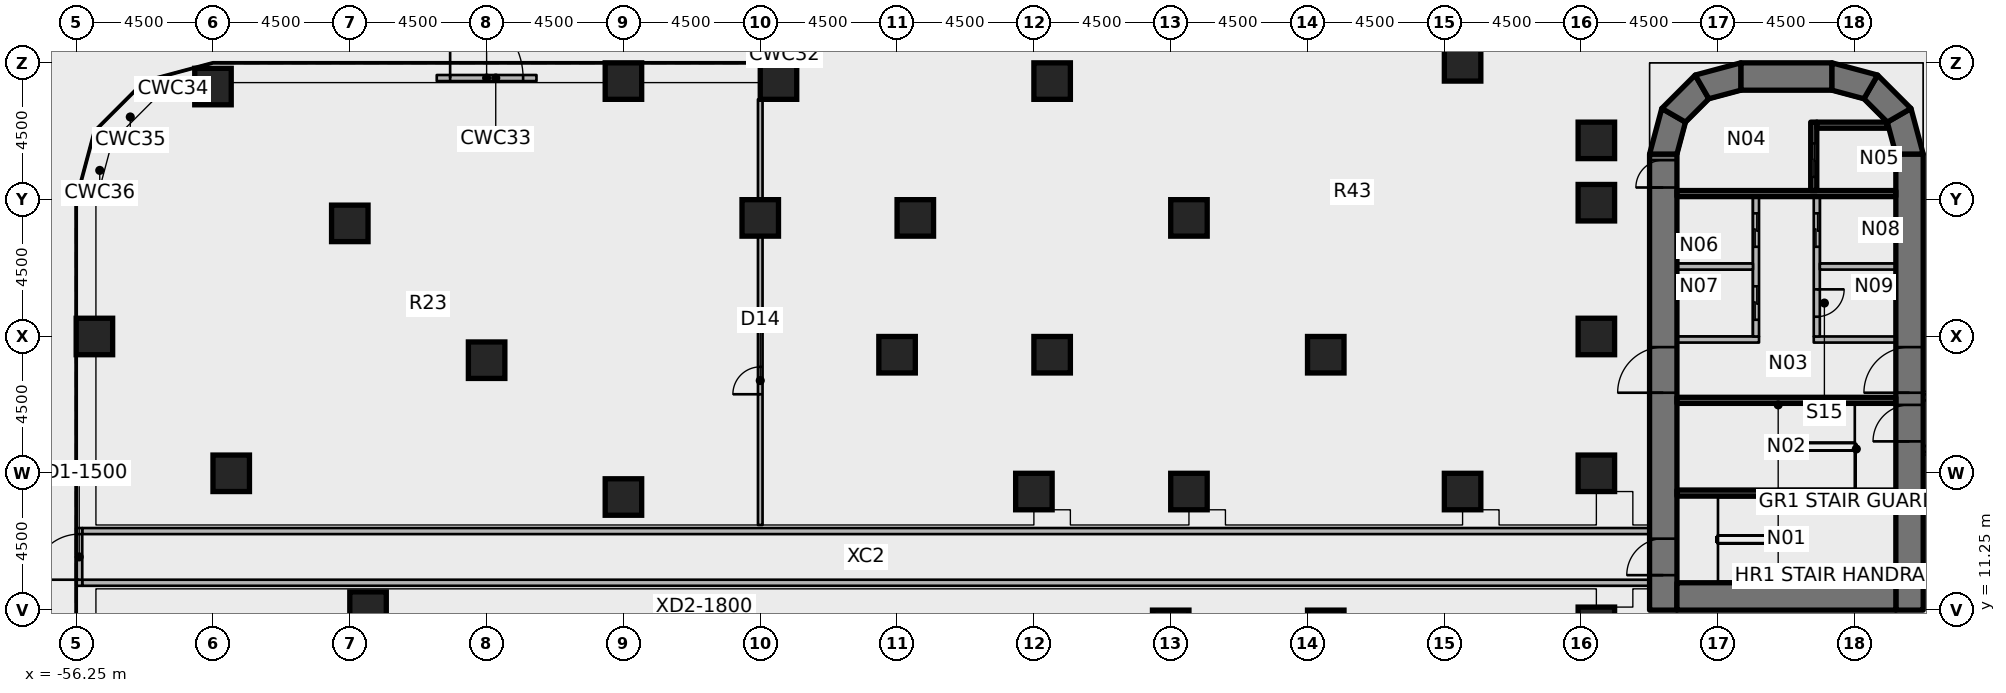
"""IFC4 building model, lengths in metres.
Left out: names, types, materials, properties, quantities, classifications, styles, units other than length and angle.
Written with IfcOpenShell. Run it as: python <this file> out.ifc"""

import sys

from ifc_helpers import new_model, si_unit, direction, frame, frame_2d, origin, origin_2d, place, context, subcontext, project, spatial, polyline, rectangle, outline, extrude, element, fill, save


model = new_model("IFC4")
c1 = context("Model", 3, precision=1e-05, world=origin(), true_north=direction((0.0, 1.0)))
c2 = subcontext(c1, "Body", "Model", "MODEL_VIEW")
j1 = project(units=[si_unit("LENGTHUNIT", "METRE"), si_unit("PLANEANGLEUNIT", "RADIAN")], contexts=[c1])
p1 = place(None, origin())
s1 = spatial("IfcSite", under=j1, at=p1, CompositionType="ELEMENT")
p2 = place(p1, origin())
s2 = spatial("IfcBuilding", under=s1, at=p2, CompositionType="ELEMENT")
p3 = place(p2, origin())
s3 = spatial("IfcBuildingStorey", under=s2, at=p3, CompositionType="ELEMENT", Elevation=0.0)
for number, where, z_axis, x_axis in (
    (1, (-55.65, 20.25, 0.0), (0.0, 0.0, 1.0), (1.0, 0.0, 0.0)),
    (2, (-51.15, 15.75, 0.0), (0.0, 0.0, 1.0), (1.0, 0.0, 0.0)),
    (3, (-51.75, 28.47, 0.0), (0.0, 0.0, 1.0), (1.0, 0.0, 0.0)),
    (4, (-46.65, 11.25, 0.0), (0.0, 0.0, 1.0), (1.0, 0.0, 0.0)),
    (5, (-47.25, 23.97, 0.0), (0.0, 0.0, 1.0), (1.0, 0.0, 0.0)),
    (6, (-42.75, 19.47, 0.0), (0.0, 0.0, 1.0), (1.0, 0.0, 0.0)),
    (7, (-38.25, 14.97, 0.0), (0.0, 0.0, 1.0), (1.0, 0.0, 0.0)),
    (8, (-38.25, 28.65, 0.0), (0.0, 0.0, 1.0), (1.0, 0.0, 0.0)),
    (9, (-33.75, 24.15, 0.0), (0.0, 0.0, 1.0), (1.0, 0.0, 0.0)),
    (10, (-33.15, 28.65, 0.0), (0.0, 0.0, 1.0), (1.0, 0.0, 0.0)),
    (11, (-29.25, 19.65, 0.0), (0.0, 0.0, 1.0), (1.0, 0.0, 0.0)),
    (12, (-28.65, 24.15, 0.0), (0.0, 0.0, 1.0), (1.0, 0.0, 0.0)),
    (13, (-24.75, 15.15, 0.0), (0.0, 0.0, 1.0), (1.0, 0.0, 0.0)),
    (14, (-24.15, 19.65, 0.0), (0.0, 0.0, 1.0), (1.0, 0.0, 0.0)),
    (15, (-24.15, 28.65, 0.0), (0.0, 0.0, 1.0), (1.0, 0.0, 0.0)),
    (16, (-20.25, 10.65, 0.0), (0.0, 0.0, 1.0), (1.0, 0.0, 0.0)),
    (17, (-19.65, 15.15, 0.0), (0.0, 0.0, 1.0), (1.0, 0.0, 0.0)),
    (18, (-19.65, 24.15, 0.0), (0.0, 0.0, 1.0), (1.0, 0.0, 0.0)),
    (19, (-15.15, 10.65, 0.0), (0.0, 0.0, 1.0), (1.0, 0.0, 0.0)),
    (20, (-15.15, 19.65, 0.0), (0.0, 0.0, 1.0), (1.0, 0.0, 0.0)),
    (21, (-10.65, 15.15, 0.0), (0.0, 0.0, 1.0), (1.0, 0.0, 0.0)),
    (22, (-10.65, 29.25, 0.0), (0.0, 0.0, 1.0), (1.0, 0.0, 0.0)),
    (23, (-6.25, 10.75, 0.0), (0.0, 0.0, 1.0), (1.0, 0.0, 0.0)),
    (24, (-6.25, 15.75, 0.0), (0.0, 0.0, 1.0), (1.0, 0.0, 0.0)),
    (25, (-6.25, 20.25, 0.0), (0.0, 0.0, 1.0), (1.0, 0.0, 0.0)),
    (26, (-6.25, 24.65, 0.0), (0.0, 0.0, 1.0), (1.0, 0.0, 0.0)),
    (27, (-6.25, 26.7, 0.0), (0.0, 0.0, 1.0), (1.0, 0.0, 0.0)),
):
    element("IfcColumn", number, at=place(p3, frame(where, z_axis=z_axis, x_axis=x_axis)), inside=s3, PredefinedType="COLUMN", context=c2, shape_type="SweptSolid", body=[
        extrude(rectangle(XDim=1.2, YDim=1.2, at=origin_2d()), origin(), (0.0, 0.0, 1.0), 6.55),
    ])
p4 = place(p3, frame((-4.05, 11.25, 0.0), z_axis=(0.0, 0.0, 1.0), x_axis=(0.0, 1.0, 0.0)))
e28 = element("IfcWall", 28, at=p4, inside=s3, PredefinedType="SHEAR", context=c2, shape_type="SweptSolid", body=[
    extrude(rectangle(XDim=15.0, YDim=0.9, at=frame_2d((7.5, 0.0))), origin(), (0.0, 0.0, 1.0), 7.0),
])
p5 = place(p4, frame((7.15, 0.0, 0.0)))
e29 = element("IfcOpeningElement", 29, at=p5, cuts=e28, PredefinedType="OPENING", context=c2, shape_type="SweptSolid", body=[
    extrude(rectangle(XDim=1.5, YDim=2.3, at=frame_2d((0.75, 1.15))), frame((0.0, 0.46, 0.0), z_axis=(0.0, -1.0, 0.0), x_axis=(1.0, 0.0, 0.0)), (0.0, 0.0, 1.0), 0.92),
])
p6 = place(p4, frame((13.9, 0.0, 0.0)))
e30 = element("IfcOpeningElement", 30, at=p6, cuts=e28, PredefinedType="OPENING", context=c2, shape_type="SweptSolid", body=[
    extrude(rectangle(XDim=0.9, YDim=2.1, at=frame_2d((0.45, 1.05))), frame((0.0, 0.46, 0.0), z_axis=(0.0, -1.0, 0.0), x_axis=(1.0, 0.0, 0.0)), (0.0, 0.0, 1.0), 0.92),
])
p7 = place(p4, frame((1.15, 0.0, 0.0)))
e31 = element("IfcOpeningElement", 31, at=p7, cuts=e28, PredefinedType="OPENING", context=c2, shape_type="SweptSolid", body=[
    extrude(rectangle(XDim=1.2, YDim=2.1, at=frame_2d((0.6, 1.05))), frame((0.0, 0.46, 0.0), z_axis=(0.0, -1.0, 0.0), x_axis=(1.0, 0.0, 0.0)), (0.0, 0.0, 1.0), 0.92),
])
p8 = place(p3, frame((4.05, 11.25, 0.0), z_axis=(0.0, 0.0, 1.0), x_axis=(0.0, 1.0, 0.0)))
e32 = element("IfcWall", 32, at=p8, inside=s3, PredefinedType="SHEAR", context=c2, shape_type="SweptSolid", body=[
    extrude(rectangle(XDim=15.0, YDim=0.9, at=frame_2d((7.5, 0.0))), origin(), (0.0, 0.0, 1.0), 7.0),
])
p9 = place(p8, frame((7.15, 0.0, 0.0)))
e33 = element("IfcOpeningElement", 33, at=p9, cuts=e32, PredefinedType="OPENING", context=c2, shape_type="SweptSolid", body=[
    extrude(rectangle(XDim=1.5, YDim=2.3, at=frame_2d((0.75, 1.15))), frame((0.0, 0.46, 0.0), z_axis=(0.0, -1.0, 0.0), x_axis=(1.0, 0.0, 0.0)), (0.0, 0.0, 1.0), 0.92),
])
p10 = place(p8, frame((5.55, 0.0, 0.0)))
e34 = element("IfcOpeningElement", 34, at=p10, cuts=e32, PredefinedType="OPENING", context=c2, shape_type="SweptSolid", body=[
    extrude(rectangle(XDim=1.2, YDim=2.1, at=frame_2d((0.6, 1.05))), frame((0.0, 0.46, 0.0), z_axis=(0.0, -1.0, 0.0), x_axis=(1.0, 0.0, 0.0)), (0.0, 0.0, 1.0), 0.92),
])
p11 = place(p3, frame((-3.6, 11.7, 0.0), z_axis=(0.0, 0.0, 1.0), x_axis=(1.0, 0.0, 0.0)))
e35 = element("IfcWall", 35, at=p11, inside=s3, PredefinedType="SHEAR", context=c2, shape_type="SweptSolid", body=[
    extrude(rectangle(XDim=7.2, YDim=0.9, at=frame_2d((3.6, 0.0))), origin(), (0.0, 0.0, 1.0), 7.0),
])
p12 = place(p3, frame((-1.5, 28.8, 0.0), z_axis=(0.0, 0.0, 1.0), x_axis=(1.0, 0.0, 0.0)))
e36 = element("IfcWall", 36, at=p12, inside=s3, PredefinedType="SHEAR", context=c2, shape_type="SweptSolid", body=[
    extrude(rectangle(XDim=3.0, YDim=0.9, at=frame_2d((1.5, 0.0))), origin(), (0.0, 0.0, 1.0), 7.0),
])
p13 = place(p3, origin())
e37 = element("IfcWall", 37, at=p13, inside=s3, PredefinedType="SHEAR", context=c2, shape_type="SweptSolid", body=[
    extrude(outline(polyline([(-4.5, 26.25), (-4.098, 27.75), (-3.319, 27.3), (-3.6, 26.25), (-4.5, 26.25)])), origin(), (0.0, 0.0, 1.0), 7.0),
])
p14 = place(p3, origin())
e38 = element("IfcWall", 38, at=p14, inside=s3, PredefinedType="SHEAR", context=c2, shape_type="SweptSolid", body=[
    extrude(outline(polyline([(-4.098, 27.75), (-3.0, 28.848), (-2.55, 28.069), (-3.319, 27.3), (-4.098, 27.75)])), origin(), (0.0, 0.0, 1.0), 7.0),
])
p15 = place(p3, origin())
e39 = element("IfcWall", 39, at=p15, inside=s3, PredefinedType="SHEAR", context=c2, shape_type="SweptSolid", body=[
    extrude(outline(polyline([(-3.0, 28.848), (-1.5, 29.25), (-1.5, 28.35), (-2.55, 28.069), (-3.0, 28.848)])), origin(), (0.0, 0.0, 1.0), 7.0),
])
p16 = place(p3, origin())
e40 = element("IfcWall", 40, at=p16, inside=s3, PredefinedType="SHEAR", context=c2, shape_type="SweptSolid", body=[
    extrude(outline(polyline([(4.5, 26.25), (4.098, 27.75), (3.319, 27.3), (3.6, 26.25), (4.5, 26.25)])), origin(), (0.0, 0.0, 1.0), 7.0),
])
p17 = place(p3, origin())
e41 = element("IfcWall", 41, at=p17, inside=s3, PredefinedType="SHEAR", context=c2, shape_type="SweptSolid", body=[
    extrude(outline(polyline([(4.098, 27.75), (3.0, 28.848), (2.55, 28.069), (3.319, 27.3), (4.098, 27.75)])), origin(), (0.0, 0.0, 1.0), 7.0),
])
p18 = place(p3, origin())
e42 = element("IfcWall", 42, at=p18, inside=s3, PredefinedType="SHEAR", context=c2, shape_type="SweptSolid", body=[
    extrude(outline(polyline([(3.0, 28.848), (1.5, 29.25), (1.5, 28.35), (2.55, 28.069), (3.0, 28.848)])), origin(), (0.0, 0.0, 1.0), 7.0),
])
p19 = place(p3, frame((-44.39, 28.75, 0.0), z_axis=(0.0, 0.0, 1.0), x_axis=(1.0, 0.0, 0.0)))
e43 = element("IfcWall", 43, at=p19, inside=s3, PredefinedType="SOLIDWALL", context=c2, shape_type="SweptSolid", body=[
    extrude(rectangle(XDim=3.28, YDim=0.2, at=frame_2d((1.64, 0.0))), origin(), (0.0, 0.0, 1.0), 5.6),
])
p20 = place(p19, frame((0.44, 0.0, 0.0)))
e44 = element("IfcOpeningElement", 44, at=p20, cuts=e43, PredefinedType="OPENING", context=c2, shape_type="SweptSolid", body=[
    extrude(rectangle(XDim=2.4, YDim=2.7, at=frame_2d((1.2, 1.35))), frame((0.0, 0.11, 0.0), z_axis=(0.0, -1.0, 0.0), x_axis=(1.0, 0.0, 0.0)), (0.0, 0.0, 1.0), 0.22),
])
p21 = place(p3, frame((-3.6, 24.95, 0.0), z_axis=(0.0, 0.0, 1.0), x_axis=(1.0, 0.0, 0.0)))
e45 = element("IfcWall", 45, at=p21, inside=s3, PredefinedType="SHEAR", context=c2, shape_type="SweptSolid", body=[
    extrude(rectangle(XDim=7.2, YDim=0.2, at=frame_2d((3.6, 0.0))), origin(), (0.0, 0.0, 1.0), 6.55),
])
p22 = place(p3, frame((0.9, 27.3, 0.0), z_axis=(0.0, 0.0, 1.0), x_axis=(0.0, -1.0, 0.0)))
e46 = element("IfcWall", 46, at=p22, inside=s3, PredefinedType="SHEAR", context=c2, shape_type="SweptSolid", body=[
    extrude(rectangle(XDim=2.25, YDim=0.2, at=frame_2d((1.125, 0.0))), origin(), (0.0, 0.0, 1.0), 6.55),
])
p23 = place(p22, frame((0.7, 0.0, 0.0)))
e47 = element("IfcOpeningElement", 47, at=p23, cuts=e46, PredefinedType="OPENING", context=c2, shape_type="SweptSolid", body=[
    extrude(rectangle(XDim=1.1, YDim=2.3, at=frame_2d((0.55, 1.15))), frame((0.0, 0.11, 0.0), z_axis=(0.0, -1.0, 0.0), x_axis=(1.0, 0.0, 0.0)), (0.0, 0.0, 1.0), 0.22),
])
p24 = place(p3, origin())
e48 = element("IfcWall", 48, at=p24, inside=s3, PredefinedType="SHEAR", context=c2, shape_type="SweptSolid", body=[
    extrude(outline(polyline([(1.0, 27.1), (3.341, 27.1), (3.291, 27.284), (3.275, 27.3), (1.0, 27.3), (1.0, 27.1)])), origin(), (0.0, 0.0, 1.0), 6.55),
])
for number, where, z_axis, x_axis in (
    (49, (-3.6, 18.15, 0.0), (0.0, 0.0, 1.0), (1.0, 0.0, 0.0)),
    (50, (-3.6, 15.1, 0.0), (0.0, 0.0, 1.0), (1.0, 0.0, 0.0)),
):
    element("IfcWall", number, at=place(p3, frame(where, z_axis=z_axis, x_axis=x_axis)), inside=s3, PredefinedType="SHEAR", context=c2, shape_type="SweptSolid", body=[
        extrude(rectangle(XDim=7.2, YDim=0.2, at=frame_2d((3.6, 0.0))), origin(), (0.0, 0.0, 1.0), 6.55),
    ])
p25 = place(p3, frame((-3.6, 20.15, 0.0), z_axis=(0.0, 0.0, 1.0), x_axis=(1.0, 0.0, 0.0)))
e51 = element("IfcWall", 51, at=p25, inside=s3, PredefinedType="PARTITIONING", context=c2, shape_type="SweptSolid", body=[
    extrude(rectangle(XDim=2.7, YDim=0.2, at=frame_2d((1.35, 0.0))), origin(), (0.0, 0.0, 1.0), 6.55),
])
p26 = place(p3, frame((-1.0, 24.85, 0.0), z_axis=(0.0, 0.0, 1.0), x_axis=(0.0, -1.0, 0.0)))
e52 = element("IfcWall", 52, at=p26, inside=s3, PredefinedType="PARTITIONING", context=c2, shape_type="SweptSolid", body=[
    extrude(rectangle(XDim=4.6, YDim=0.2, at=frame_2d((2.3, 0.0))), origin(), (0.0, 0.0, 1.0), 6.55),
])
p27 = place(p26, frame((0.55, 0.0, 0.0)))
e53 = element("IfcOpeningElement", 53, at=p27, cuts=e52, PredefinedType="OPENING", context=c2, shape_type="SweptSolid", body=[
    extrude(rectangle(XDim=1.1, YDim=2.3, at=frame_2d((0.55, 1.15))), frame((0.0, 0.11, 0.0), z_axis=(0.0, -1.0, 0.0), x_axis=(1.0, 0.0, 0.0)), (0.0, 0.0, 1.0), 0.22),
])
p28 = place(p26, frame((2.95, 0.0, 0.0)))
e54 = element("IfcOpeningElement", 54, at=p28, cuts=e52, PredefinedType="OPENING", context=c2, shape_type="SweptSolid", body=[
    extrude(rectangle(XDim=1.1, YDim=2.3, at=frame_2d((0.55, 1.15))), frame((0.0, 0.11, 0.0), z_axis=(0.0, -1.0, 0.0), x_axis=(1.0, 0.0, 0.0)), (0.0, 0.0, 1.0), 0.22),
])
p29 = place(p3, frame((0.9, 20.15, 0.0), z_axis=(0.0, 0.0, 1.0), x_axis=(1.0, 0.0, 0.0)))
e55 = element("IfcWall", 55, at=p29, inside=s3, PredefinedType="PARTITIONING", context=c2, shape_type="SweptSolid", body=[
    extrude(rectangle(XDim=2.7, YDim=0.2, at=frame_2d((1.35, 0.0))), origin(), (0.0, 0.0, 1.0), 6.55),
])
p30 = place(p3, frame((1.0, 24.85, 0.0), z_axis=(0.0, 0.0, 1.0), x_axis=(0.0, -1.0, 0.0)))
e56 = element("IfcWall", 56, at=p30, inside=s3, PredefinedType="PARTITIONING", context=c2, shape_type="SweptSolid", body=[
    extrude(rectangle(XDim=4.6, YDim=0.2, at=frame_2d((2.3, 0.0))), origin(), (0.0, 0.0, 1.0), 6.55),
])
p31 = place(p30, frame((0.55, 0.0, 0.0)))
e57 = element("IfcOpeningElement", 57, at=p31, cuts=e56, PredefinedType="OPENING", context=c2, shape_type="SweptSolid", body=[
    extrude(rectangle(XDim=1.1, YDim=2.3, at=frame_2d((0.55, 1.15))), frame((0.0, 0.11, 0.0), z_axis=(0.0, -1.0, 0.0), x_axis=(1.0, 0.0, 0.0)), (0.0, 0.0, 1.0), 0.22),
])
p32 = place(p30, frame((3.05, 0.0, 0.0)))
e58 = element("IfcOpeningElement", 58, at=p32, cuts=e56, PredefinedType="OPENING", context=c2, shape_type="SweptSolid", body=[
    extrude(rectangle(XDim=0.9, YDim=2.1, at=frame_2d((0.45, 1.05))), frame((0.0, 0.11, 0.0), z_axis=(0.0, -1.0, 0.0), x_axis=(1.0, 0.0, 0.0)), (0.0, 0.0, 1.0), 0.22),
])
for number, where, z_axis, x_axis in (
    (59, (-3.6, 22.55, 0.0), (0.0, 0.0, 1.0), (1.0, 0.0, 0.0)),
    (60, (1.1, 22.55, 0.0), (0.0, 0.0, 1.0), (1.0, 0.0, 0.0)),
):
    element("IfcWall", number, at=place(p3, frame(where, z_axis=z_axis, x_axis=x_axis)), inside=s3, PredefinedType="PARTITIONING", context=c2, shape_type="SweptSolid", body=[
        extrude(rectangle(XDim=2.5, YDim=0.2, at=frame_2d((1.25, 0.0))), origin(), (0.0, 0.0, 1.0), 6.55),
    ])
for number, where, z_axis, x_axis in (
    (61, (4.5, 18.25, 0.0), (0.0, 0.0, 1.0), (1.0, 0.0, 0.0)),
    (62, (4.5, 16.55, 0.0), (0.0, 0.0, 1.0), (1.0, 0.0, 0.0)),
    (63, (-4.5, 12.15, 0.0), (0.0, 0.0, 1.0), (-1.0, 0.0, 0.0)),
    (64, (-4.5, 13.85, 0.0), (0.0, 0.0, 1.0), (-1.0, 0.0, 0.0)),
):
    element("IfcWall", number, at=place(p3, frame(where, z_axis=z_axis, x_axis=x_axis)), inside=s3, PredefinedType="PARTITIONING", context=c2, shape_type="SweptSolid", body=[
        extrude(rectangle(XDim=51.55, YDim=0.2, at=frame_2d((25.775, 0.0))), origin(), (0.0, 0.0, 1.0), 6.55),
    ])
p33 = place(p3, frame((-56.15, 12.05, 0.0), z_axis=(0.0, 0.0, 1.0), x_axis=(0.0, 1.0, 0.0)))
e65 = element("IfcWall", 65, at=p33, inside=s3, PredefinedType="PARTITIONING", context=c2, shape_type="SweptSolid", body=[
    extrude(rectangle(XDim=1.9, YDim=0.2, at=frame_2d((0.95, 0.0))), origin(), (0.0, 0.0, 1.0), 6.55),
])
p34 = place(p33, frame((0.2, 0.0, 0.0)))
e66 = element("IfcOpeningElement", 66, at=p34, cuts=e65, PredefinedType="OPENING", context=c2, shape_type="SweptSolid", body=[
    extrude(rectangle(XDim=1.5, YDim=2.1, at=frame_2d((0.75, 1.05))), frame((0.0, 0.11, 0.0), z_axis=(0.0, -1.0, 0.0), x_axis=(1.0, 0.0, 0.0)), (0.0, 0.0, 1.0), 0.22),
])
p35 = place(p3, frame((-33.75, 28.05, 0.0), z_axis=(0.0, 0.0, 1.0), x_axis=(0.0, -1.0, 0.0)))
e67 = element("IfcWall", 67, at=p35, inside=s3, PredefinedType="PARTITIONING", context=c2, shape_type="SweptSolid", body=[
    extrude(rectangle(XDim=3.3, YDim=0.15, at=frame_2d((1.65, 0.0))), origin(), (0.0, 0.0, 1.0), 6.55),
])
p36 = place(p3, frame((-33.75, 14.05, 0.0), z_axis=(0.0, 0.0, 1.0), x_axis=(0.0, 1.0, 0.0)))
e68 = element("IfcWall", 68, at=p36, inside=s3, PredefinedType="PARTITIONING", context=c2, shape_type="SweptSolid", body=[
    extrude(rectangle(XDim=9.5, YDim=0.15, at=frame_2d((4.75, 0.0))), origin(), (0.0, 0.0, 1.0), 6.55),
])
p37 = place(p36, frame((4.3, 0.0, 0.0)))
e69 = element("IfcOpeningElement", 69, at=p37, cuts=e68, PredefinedType="OPENING", context=c2, shape_type="SweptSolid", body=[
    extrude(rectangle(XDim=0.9, YDim=2.1, at=frame_2d((0.45, 1.05))), frame((0.0, 0.085, 0.0), z_axis=(0.0, -1.0, 0.0), x_axis=(1.0, 0.0, 0.0)), (0.0, 0.0, 1.0), 0.17),
])
p38 = place(p20, origin())
e70 = element("IfcDoor", 70, at=p38, inside=s3, OperationType="SINGLE_SWING_LEFT", PredefinedType="DOOR", context=c2, shape_type="SweptSolid", body=[
    extrude(rectangle(XDim=2.4, YDim=2.7, at=frame_2d((1.2, 1.35))), frame((0.0, 0.025, 0.0), z_axis=(0.0, -1.0, 0.0), x_axis=(1.0, 0.0, 0.0)), (0.0, 0.0, 1.0), 0.05),
])
fill(e44, e70)
p39 = place(p5, origin())
e71 = element("IfcDoor", 71, at=p39, inside=s3, OperationType="DOUBLE_DOOR_SINGLE_SWING", PredefinedType="DOOR", context=c2, shape_type="SweptSolid", body=[
    extrude(rectangle(XDim=1.5, YDim=2.3, at=frame_2d((0.75, 1.15))), frame((0.0, 0.025, 0.0), z_axis=(0.0, -1.0, 0.0), x_axis=(1.0, 0.0, 0.0)), (0.0, 0.0, 1.0), 0.05),
])
fill(e29, e71)
p40 = place(p9, origin())
e72 = element("IfcDoor", 72, at=p40, inside=s3, OperationType="DOUBLE_DOOR_SINGLE_SWING", PredefinedType="DOOR", context=c2, shape_type="SweptSolid", body=[
    extrude(rectangle(XDim=1.5, YDim=2.3, at=frame_2d((0.75, 1.15))), frame((0.0, 0.025, 0.0), z_axis=(0.0, -1.0, 0.0), x_axis=(1.0, 0.0, 0.0)), (0.0, 0.0, 1.0), 0.05),
])
fill(e33, e72)
p41 = place(p6, origin())
e73 = element("IfcDoor", 73, at=p41, inside=s3, OperationType="SINGLE_SWING_LEFT", PredefinedType="DOOR", context=c2, shape_type="SweptSolid", body=[
    extrude(rectangle(XDim=0.9, YDim=2.1, at=frame_2d((0.45, 1.05))), frame((0.0, 0.025, 0.0), z_axis=(0.0, -1.0, 0.0), x_axis=(1.0, 0.0, 0.0)), (0.0, 0.0, 1.0), 0.05),
])
fill(e30, e73)
p42 = place(p10, origin())
e74 = element("IfcDoor", 74, at=p42, inside=s3, OperationType="SINGLE_SWING_RIGHT", PredefinedType="DOOR", context=c2, shape_type="SweptSolid", body=[
    extrude(rectangle(XDim=1.2, YDim=2.1, at=frame_2d((0.6, 1.05))), frame((0.0, 0.025, 0.0), z_axis=(0.0, -1.0, 0.0), x_axis=(1.0, 0.0, 0.0)), (0.0, 0.0, 1.0), 0.05),
])
fill(e34, e74)
p43 = place(p7, origin())
e75 = element("IfcDoor", 75, at=p43, inside=s3, OperationType="SINGLE_SWING_LEFT", PredefinedType="DOOR", context=c2, shape_type="SweptSolid", body=[
    extrude(rectangle(XDim=1.2, YDim=2.1, at=frame_2d((0.6, 1.05))), frame((0.0, 0.025, 0.0), z_axis=(0.0, -1.0, 0.0), x_axis=(1.0, 0.0, 0.0)), (0.0, 0.0, 1.0), 0.05),
])
fill(e31, e75)
p44 = place(p23, origin())
e76 = element("IfcDoor", 76, at=p44, inside=s3, OperationType="DOUBLE_DOOR_SLIDING", PredefinedType="DOOR", context=c2, shape_type="SweptSolid", body=[
    extrude(rectangle(XDim=1.1, YDim=2.3, at=frame_2d((0.55, 1.15))), frame((0.0, 0.025, 0.0), z_axis=(0.0, -1.0, 0.0), x_axis=(1.0, 0.0, 0.0)), (0.0, 0.0, 1.0), 0.05),
])
fill(e47, e76)
p45 = place(p27, origin())
e77 = element("IfcDoor", 77, at=p45, inside=s3, OperationType="DOUBLE_DOOR_SLIDING", PredefinedType="DOOR", context=c2, shape_type="SweptSolid", body=[
    extrude(rectangle(XDim=1.1, YDim=2.3, at=frame_2d((0.55, 1.15))), frame((0.0, 0.025, 0.0), z_axis=(0.0, -1.0, 0.0), x_axis=(1.0, 0.0, 0.0)), (0.0, 0.0, 1.0), 0.05),
])
fill(e53, e77)
p46 = place(p28, origin())
e78 = element("IfcDoor", 78, at=p46, inside=s3, OperationType="DOUBLE_DOOR_SLIDING", PredefinedType="DOOR", context=c2, shape_type="SweptSolid", body=[
    extrude(rectangle(XDim=1.1, YDim=2.3, at=frame_2d((0.55, 1.15))), frame((0.0, 0.025, 0.0), z_axis=(0.0, -1.0, 0.0), x_axis=(1.0, 0.0, 0.0)), (0.0, 0.0, 1.0), 0.05),
])
fill(e54, e78)
p47 = place(p31, origin())
e79 = element("IfcDoor", 79, at=p47, inside=s3, OperationType="DOUBLE_DOOR_SLIDING", PredefinedType="DOOR", context=c2, shape_type="SweptSolid", body=[
    extrude(rectangle(XDim=1.1, YDim=2.3, at=frame_2d((0.55, 1.15))), frame((0.0, 0.025, 0.0), z_axis=(0.0, -1.0, 0.0), x_axis=(1.0, 0.0, 0.0)), (0.0, 0.0, 1.0), 0.05),
])
fill(e57, e79)
p48 = place(p32, origin())
e80 = element("IfcDoor", 80, at=p48, inside=s3, OperationType="SINGLE_SWING_RIGHT", PredefinedType="DOOR", context=c2, shape_type="SweptSolid", body=[
    extrude(rectangle(XDim=0.9, YDim=2.1, at=frame_2d((0.45, 1.05))), frame((0.0, 0.025, 0.0), z_axis=(0.0, -1.0, 0.0), x_axis=(1.0, 0.0, 0.0)), (0.0, 0.0, 1.0), 0.05),
])
fill(e58, e80)
p49 = place(p34, origin())
e81 = element("IfcDoor", 81, at=p49, inside=s3, OperationType="DOUBLE_DOOR_DOUBLE_SWING", PredefinedType="DOOR", context=c2, shape_type="SweptSolid", body=[
    extrude(rectangle(XDim=1.5, YDim=2.1, at=frame_2d((0.75, 1.05))), frame((0.0, 0.025, 0.0), z_axis=(0.0, -1.0, 0.0), x_axis=(1.0, 0.0, 0.0)), (0.0, 0.0, 1.0), 0.05),
])
fill(e66, e81)
p50 = place(p37, origin())
e82 = element("IfcDoor", 82, at=p50, inside=s3, OperationType="SINGLE_SWING_LEFT", PredefinedType="DOOR", context=c2, shape_type="SweptSolid", body=[
    extrude(rectangle(XDim=0.9, YDim=2.1, at=frame_2d((0.45, 1.05))), frame((0.0, 0.025, 0.0), z_axis=(0.0, -1.0, 0.0), x_axis=(1.0, 0.0, 0.0)), (0.0, 0.0, 1.0), 0.05),
])
fill(e69, e82)
save(model, sys.argv[1])
